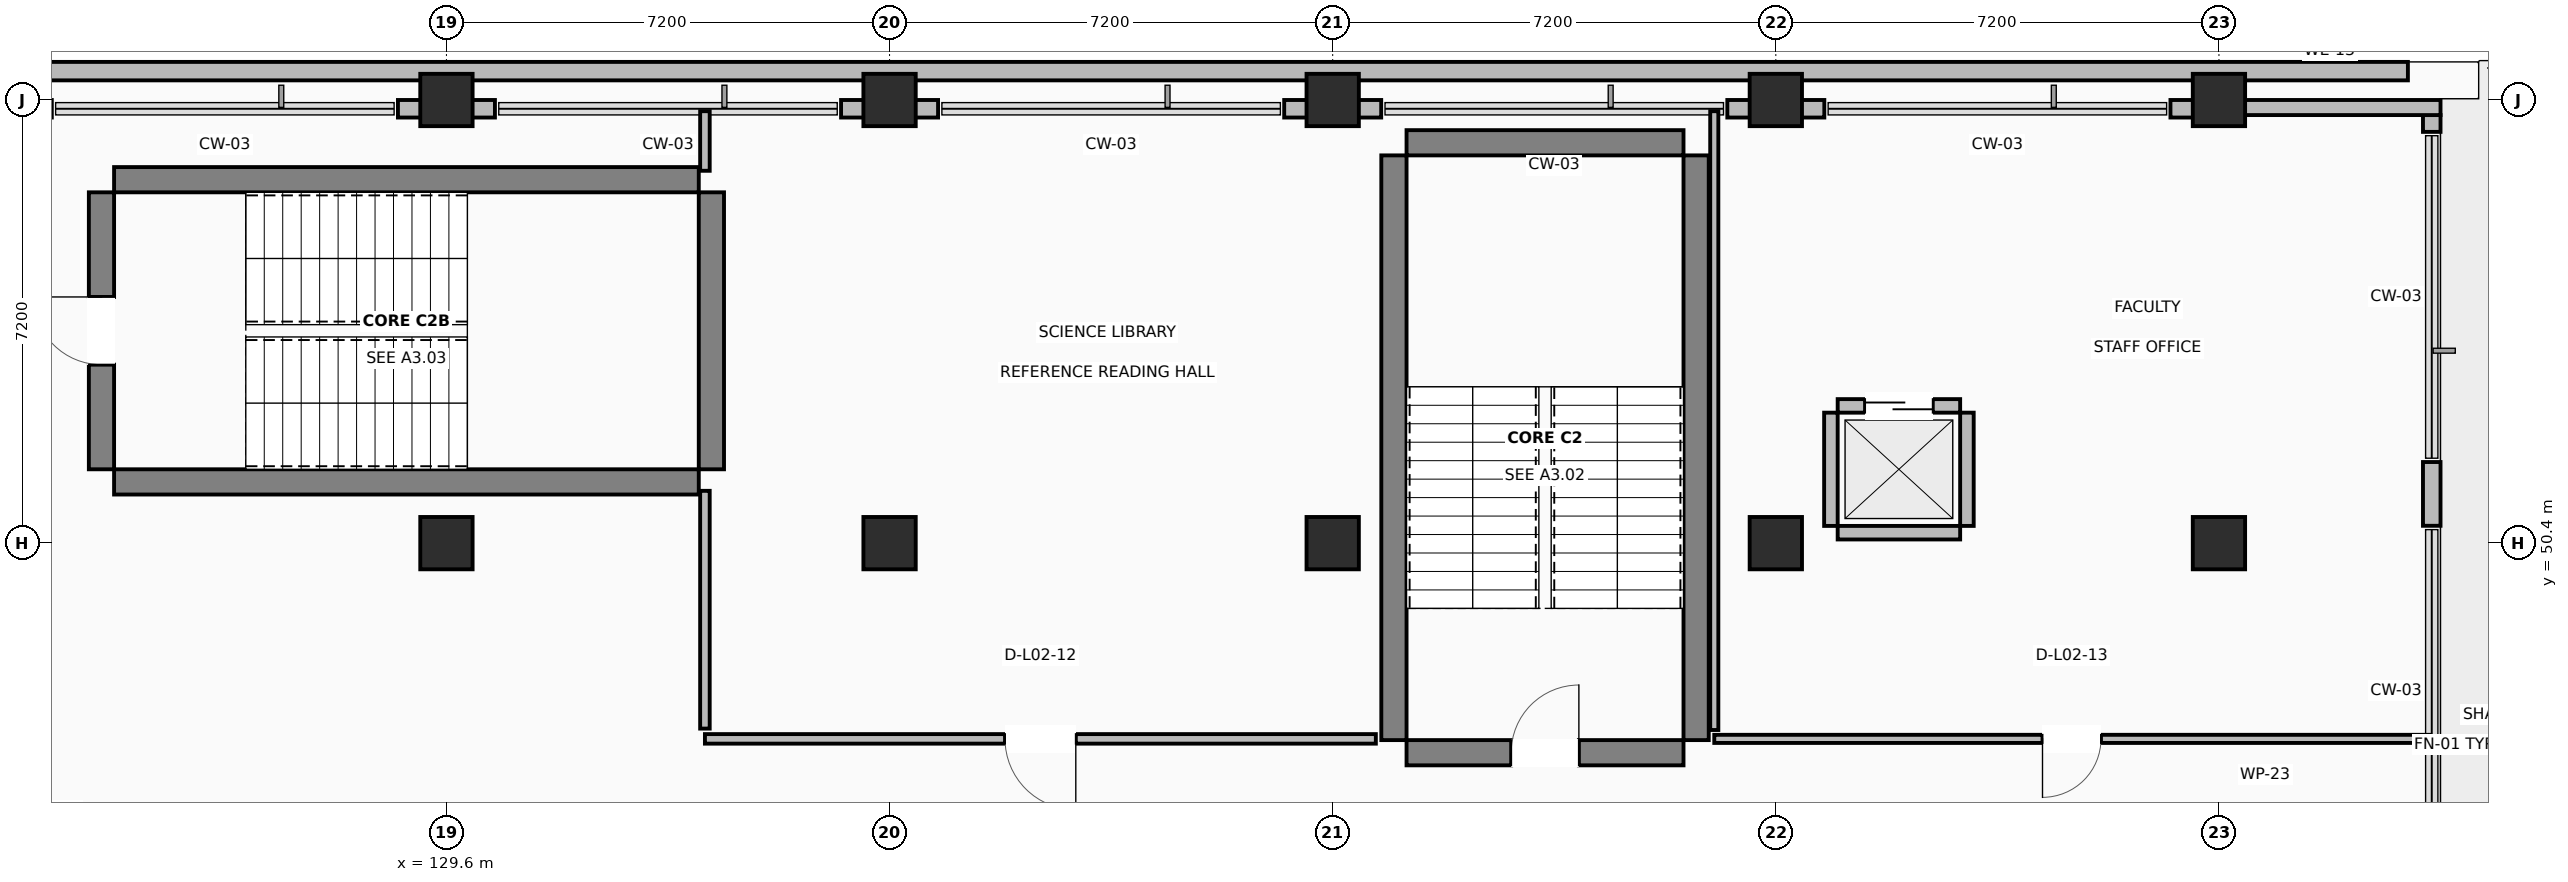
"""IFC4 building model, lengths in metres.
Left out: names, types, materials, properties, quantities, classifications, styles, units other than length and angle.
Written with IfcOpenShell. Run it as: python <this file> out.ifc"""

import sys

from ifc_helpers import new_model, si_unit, direction, frame, frame_2d, origin, origin_2d, place, context, subcontext, project, spatial, rectangle, extrude, element, fill, save


model = new_model("IFC4")
c1 = context("Model", 3, precision=1e-05, world=origin(), true_north=direction((0.0, 1.0)))
c2 = subcontext(c1, "Body", "Model", "MODEL_VIEW")
j1 = project(units=[si_unit("LENGTHUNIT", "METRE"), si_unit("PLANEANGLEUNIT", "RADIAN")], contexts=[c1])
p1 = place(None, origin())
s1 = spatial("IfcSite", under=j1, at=p1, CompositionType="ELEMENT")
p2 = place(p1, origin())
s2 = spatial("IfcBuilding", under=s1, at=p2, CompositionType="ELEMENT")
p3 = place(p2, frame((0.0, 0.0, 9.0)))
s3 = spatial("IfcBuildingStorey", under=s2, at=p3, CompositionType="ELEMENT", Elevation=9.0)
for number, where, z_axis, x_axis in (
    (1, (129.6, 50.4, 0.0), (0.0, 0.0, 1.0), (1.0, 0.0, 0.0)),
    (2, (129.6, 57.6, 0.0), (0.0, 0.0, 1.0), (1.0, 0.0, 0.0)),
    (3, (136.8, 50.4, 0.0), (0.0, 0.0, 1.0), (1.0, 0.0, 0.0)),
    (4, (136.8, 57.6, 0.0), (0.0, 0.0, 1.0), (1.0, 0.0, 0.0)),
    (5, (144.0, 50.4, 0.0), (0.0, 0.0, 1.0), (1.0, 0.0, 0.0)),
    (6, (144.0, 57.6, 0.0), (0.0, 0.0, 1.0), (1.0, 0.0, 0.0)),
    (7, (151.2, 50.4, 0.0), (0.0, 0.0, 1.0), (1.0, 0.0, 0.0)),
    (8, (151.2, 57.6, 0.0), (0.0, 0.0, 1.0), (1.0, 0.0, 0.0)),
    (9, (158.4, 50.4, 0.0), (0.0, 0.0, 1.0), (1.0, 0.0, 0.0)),
    (10, (158.4, 57.6, 0.0), (0.0, 0.0, 1.0), (1.0, 0.0, 0.0)),
):
    element("IfcColumn", number, at=place(p3, frame(where, z_axis=z_axis, x_axis=x_axis)), inside=s3, PredefinedType="COLUMN", context=c2, shape_type="SweptSolid", body=[
        extrude(rectangle(XDim=0.85, YDim=0.85, at=origin_2d()), origin(), (0.0, 0.0, 1.0), 4.22),
    ])
p4 = place(p3, frame((145.2, 46.995, 0.0), z_axis=(0.0, 0.0, 1.0), x_axis=(1.0, 0.0, 0.0)))
e11 = element("IfcWall", 11, at=p4, inside=s3, PredefinedType="SHEAR", context=c2, shape_type="SweptSolid", body=[
    extrude(rectangle(XDim=4.5, YDim=0.41, at=frame_2d((2.25, 0.0))), origin(), (0.0, 0.0, 1.0), 4.22),
])
p5 = place(p4, frame((1.7, 0.0, 0.0)))
e12 = element("IfcOpeningElement", 12, at=p5, cuts=e11, PredefinedType="OPENING", context=c2, shape_type="SweptSolid", body=[
    extrude(rectangle(XDim=1.1, YDim=2.15, at=frame_2d((0.55, 1.075))), frame((0.0, 0.215, 0.0), z_axis=(0.0, -1.0, 0.0), x_axis=(1.0, 0.0, 0.0)), (0.0, 0.0, 1.0), 0.43),
])
p6 = place(p3, frame((145.2, 56.905, 0.0), z_axis=(0.0, 0.0, 1.0), x_axis=(1.0, 0.0, 0.0)))
e13 = element("IfcWall", 13, at=p6, inside=s3, PredefinedType="SHEAR", context=c2, shape_type="SweptSolid", body=[
    extrude(rectangle(XDim=4.5, YDim=0.41, at=frame_2d((2.25, 0.0))), origin(), (0.0, 0.0, 1.0), 4.22),
])
for number, where, z_axis, x_axis in (
    (14, (144.995, 47.2, 0.0), (0.0, 0.0, 1.0), (0.0, 1.0, 0.0)),
    (15, (149.905, 47.2, 0.0), (0.0, 0.0, 1.0), (0.0, 1.0, 0.0)),
    (16, (124.2, 51.395, 0.0), (0.0, 0.0, 1.0), (1.0, 0.0, 0.0)),
    (17, (124.2, 56.305, 0.0), (0.0, 0.0, 1.0), (1.0, 0.0, 0.0)),
):
    element("IfcWall", number, at=place(p3, frame(where, z_axis=z_axis, x_axis=x_axis)), inside=s3, PredefinedType="SHEAR", context=c2, shape_type="SweptSolid", body=[
        extrude(rectangle(XDim=9.5, YDim=0.41, at=frame_2d((4.75, 0.0))), origin(), (0.0, 0.0, 1.0), 4.22),
    ])
p7 = place(p3, frame((123.995, 51.6, 0.0), z_axis=(0.0, 0.0, 1.0), x_axis=(0.0, 1.0, 0.0)))
e18 = element("IfcWall", 18, at=p7, inside=s3, PredefinedType="SHEAR", context=c2, shape_type="SweptSolid", body=[
    extrude(rectangle(XDim=4.5, YDim=0.41, at=frame_2d((2.25, 0.0))), origin(), (0.0, 0.0, 1.0), 4.22),
])
p8 = place(p7, frame((1.7, 0.0, 0.0)))
e19 = element("IfcOpeningElement", 19, at=p8, cuts=e18, PredefinedType="OPENING", context=c2, shape_type="SweptSolid", body=[
    extrude(rectangle(XDim=1.1, YDim=2.15, at=frame_2d((0.55, 1.075))), frame((0.0, 0.215, 0.0), z_axis=(0.0, -1.0, 0.0), x_axis=(1.0, 0.0, 0.0)), (0.0, 0.0, 1.0), 0.43),
])
p9 = place(p3, frame((133.905, 51.6, 0.0), z_axis=(0.0, 0.0, 1.0), x_axis=(0.0, 1.0, 0.0)))
e20 = element("IfcWall", 20, at=p9, inside=s3, PredefinedType="SHEAR", context=c2, shape_type="SweptSolid", body=[
    extrude(rectangle(XDim=4.5, YDim=0.41, at=frame_2d((2.25, 0.0))), origin(), (0.0, 0.0, 1.0), 4.22),
])
p10 = place(p3, frame((161.857, 50.682, 0.0), z_axis=(0.0, 0.0, 1.0), x_axis=(0.0, 1.0, 0.0)))
e21 = element("IfcWall", 21, at=p10, inside=s3, PredefinedType="STANDARD", context=c2, shape_type="SweptSolid", body=[
    extrude(rectangle(XDim=1.036, YDim=0.285, at=frame_2d((0.518, 0.0))), origin(), (0.0, 0.0, 1.0), 3.26),
])
p11 = place(p3, frame((161.857, 57.082, 0.0), z_axis=(0.0, 0.0, 1.0), x_axis=(0.0, 1.0, 0.0)))
e22 = element("IfcWall", 22, at=p11, inside=s3, PredefinedType="STANDARD", context=c2, shape_type="SweptSolid", body=[
    extrude(rectangle(XDim=0.273, YDim=0.285, at=frame_2d((0.136, 0.0))), origin(), (0.0, 0.0, 1.0), 3.26),
])
p12 = place(p3, frame((158.4, 57.478, 0.0), z_axis=(0.0, 0.0, 1.0), x_axis=(1.0, 0.0, 0.0)))
e23 = element("IfcWall", 23, at=p12, inside=s3, PredefinedType="STANDARD", context=c2, shape_type="SweptSolid", body=[
    extrude(rectangle(XDim=3.6, YDim=0.245, at=frame_2d((1.8, 0.0))), origin(), (0.0, 0.0, 1.0), 3.26),
])
p13 = place(p3, frame((158.4, 57.458, 0.0), z_axis=(0.0, 0.0, 1.0), x_axis=(-1.0, 0.0, 0.0)))
e24 = element("IfcWall", 24, at=p13, inside=s3, PredefinedType="STANDARD", context=c2, shape_type="SweptSolid", body=[
    extrude(rectangle(XDim=0.788, YDim=0.285, at=frame_2d((0.394, 0.0))), origin(), (0.0, 0.0, 1.0), 3.26),
])
p14 = place(p3, frame((151.988, 57.458, 0.0), z_axis=(0.0, 0.0, 1.0), x_axis=(-1.0, 0.0, 0.0)))
e25 = element("IfcWall", 25, at=p14, inside=s3, PredefinedType="STANDARD", context=c2, shape_type="SweptSolid", body=[
    extrude(rectangle(XDim=1.576, YDim=0.285, at=frame_2d((0.788, 0.0))), origin(), (0.0, 0.0, 1.0), 3.26),
])
p15 = place(p3, frame((144.788, 57.458, 0.0), z_axis=(0.0, 0.0, 1.0), x_axis=(-1.0, 0.0, 0.0)))
e26 = element("IfcWall", 26, at=p15, inside=s3, PredefinedType="STANDARD", context=c2, shape_type="SweptSolid", body=[
    extrude(rectangle(XDim=1.576, YDim=0.285, at=frame_2d((0.788, 0.0))), origin(), (0.0, 0.0, 1.0), 3.26),
])
for number, where, z_axis, x_axis in (
    (27, (137.588, 57.458, 0.0), (0.0, 0.0, 1.0), (-1.0, 0.0, 0.0)),
    (28, (130.388, 57.458, 0.0), (0.0, 0.0, 1.0), (-1.0, 0.0, 0.0)),
):
    element("IfcWall", number, at=place(p3, frame(where, z_axis=z_axis, x_axis=x_axis)), inside=s3, PredefinedType="STANDARD", context=c2, shape_type="SweptSolid", body=[
        extrude(rectangle(XDim=1.576, YDim=0.285, at=frame_2d((0.788, 0.0))), origin(), (0.0, 0.0, 1.0), 3.26),
    ])
p16 = place(p3, frame((114.58, 58.069, 0.0), z_axis=(0.0, 0.0, 1.0), x_axis=(1.0, 0.0, 0.0)))
e29 = element("IfcWall", 29, at=p16, inside=s3, PredefinedType="PARAPET", context=c2, shape_type="SweptSolid", body=[
    extrude(rectangle(XDim=46.89, YDim=0.3, at=frame_2d((23.445, 0.0))), origin(), (0.0, 0.0, 1.0), 1.18),
])
p17 = place(p3, frame((152.205, 50.57, 0.0), z_axis=(0.0, 0.0, 1.0), x_axis=(1.0, 0.0, 0.0)))
e30 = element("IfcWall", 30, at=p17, inside=s3, PredefinedType="STANDARD", context=c2, shape_type="SweptSolid", body=[
    extrude(rectangle(XDim=1.99, YDim=0.22, at=frame_2d((0.995, 0.0))), origin(), (0.0, 0.0, 1.0), 3.26),
])
p18 = place(p3, frame((152.205, 52.63, 0.0), z_axis=(0.0, 0.0, 1.0), x_axis=(1.0, 0.0, 0.0)))
e31 = element("IfcWall", 31, at=p18, inside=s3, PredefinedType="STANDARD", context=c2, shape_type="SweptSolid", body=[
    extrude(rectangle(XDim=1.99, YDim=0.22, at=frame_2d((0.995, 0.0))), origin(), (0.0, 0.0, 1.0), 3.26),
])
p19 = place(p18, frame((0.445, 0.0, 0.0)))
e32 = element("IfcOpeningElement", 32, at=p19, cuts=e31, PredefinedType="OPENING", context=c2, shape_type="SweptSolid", body=[
    extrude(rectangle(XDim=1.1, YDim=2.15, at=frame_2d((0.55, 1.075))), frame((0.0, 0.12, 0.0), z_axis=(0.0, -1.0, 0.0), x_axis=(1.0, 0.0, 0.0)), (0.0, 0.0, 1.0), 0.24),
])
for number, where, z_axis, x_axis in (
    (33, (152.095, 50.68, 0.0), (0.0, 0.0, 1.0), (0.0, 1.0, 0.0)),
    (34, (154.305, 50.68, 0.0), (0.0, 0.0, 1.0), (0.0, 1.0, 0.0)),
):
    element("IfcWall", number, at=place(p3, frame(where, z_axis=z_axis, x_axis=x_axis)), inside=s3, PredefinedType="STANDARD", context=c2, shape_type="SweptSolid", body=[
        extrude(rectangle(XDim=1.84, YDim=0.22, at=frame_2d((0.92, 0.0))), origin(), (0.0, 0.0, 1.0), 3.26),
    ])
p20 = place(p3, frame((144.701, 47.22, 0.0), z_axis=(0.0, 0.0, 1.0), x_axis=(-1.0, 0.0, 0.0)))
e35 = element("IfcWall", 35, at=p20, inside=s3, PredefinedType="PARTITIONING", context=c2, shape_type="SweptSolid", body=[
    extrude(rectangle(XDim=10.901, YDim=0.155, at=frame_2d((5.45, 0.0))), origin(), (0.0, 0.0, 1.0), 3.26),
])
p21 = place(p20, frame((4.875, 0.0, 0.0)))
e36 = element("IfcOpeningElement", 36, at=p21, cuts=e35, PredefinedType="OPENING", context=c2, shape_type="SweptSolid", body=[
    extrude(rectangle(XDim=1.15, YDim=2.15, at=frame_2d((0.575, 1.075))), frame((0.0, 0.087, 0.0), z_axis=(0.0, -1.0, 0.0), x_axis=(1.0, 0.0, 0.0)), (0.0, 0.0, 1.0), 0.175),
])
p22 = place(p3, frame((133.8, 47.387, 0.0), z_axis=(0.0, 0.0, 1.0), x_axis=(0.0, 1.0, 0.0)))
e37 = element("IfcWall", 37, at=p22, inside=s3, PredefinedType="PARTITIONING", context=c2, shape_type="SweptSolid", body=[
    extrude(rectangle(XDim=3.863, YDim=0.155, at=frame_2d((1.932, 0.0))), origin(), (0.0, 0.0, 1.0), 3.26),
])
p23 = place(p3, frame((133.8, 56.45, 0.0), z_axis=(0.0, 0.0, 1.0), x_axis=(0.0, 1.0, 0.0)))
e38 = element("IfcWall", 38, at=p23, inside=s3, PredefinedType="PARTITIONING", context=c2, shape_type="SweptSolid", body=[
    extrude(rectangle(XDim=0.968, YDim=0.155, at=frame_2d((0.484, 0.0))), origin(), (0.0, 0.0, 1.0), 3.26),
])
p24 = place(p3, frame((161.817, 47.22, 0.0), z_axis=(0.0, 0.0, 1.0), x_axis=(-1.0, 0.0, 0.0)))
e39 = element("IfcWall", 39, at=p24, inside=s3, PredefinedType="PARTITIONING", context=c2, shape_type="SweptSolid", body=[
    extrude(rectangle(XDim=11.617, YDim=0.132, at=frame_2d((5.809, 0.0))), origin(), (0.0, 0.0, 1.0), 3.26),
])
p25 = place(p24, frame((5.334, 0.0, 0.0)))
e40 = element("IfcOpeningElement", 40, at=p25, cuts=e39, PredefinedType="OPENING", context=c2, shape_type="SweptSolid", body=[
    extrude(rectangle(XDim=0.95, YDim=2.1, at=frame_2d((0.475, 1.05))), frame((0.0, 0.076, 0.0), z_axis=(0.0, -1.0, 0.0), x_axis=(1.0, 0.0, 0.0)), (0.0, 0.0, 1.0), 0.152),
])
p26 = place(p3, frame((150.2, 47.364, 0.0), z_axis=(0.0, 0.0, 1.0), x_axis=(0.0, 1.0, 0.0)))
e41 = element("IfcWall", 41, at=p26, inside=s3, PredefinedType="PARTITIONING", context=c2, shape_type="SweptSolid", body=[
    extrude(rectangle(XDim=10.054, YDim=0.132, at=frame_2d((5.027, 0.0))), origin(), (0.0, 0.0, 1.0), 3.26),
])
p27 = place(p5, origin())
e42 = element("IfcDoor", 42, at=p27, inside=s3, OperationType="SINGLE_SWING_RIGHT", PredefinedType="DOOR", context=c2, shape_type="SweptSolid", body=[
    extrude(rectangle(XDim=1.1, YDim=2.15, at=frame_2d((0.55, 1.075))), frame((0.0, 0.025, 0.0), z_axis=(0.0, -1.0, 0.0), x_axis=(1.0, 0.0, 0.0)), (0.0, 0.0, 1.0), 0.05),
])
fill(e12, e42)
p28 = place(p8, origin())
e43 = element("IfcDoor", 43, at=p28, inside=s3, OperationType="SINGLE_SWING_RIGHT", PredefinedType="DOOR", context=c2, shape_type="SweptSolid", body=[
    extrude(rectangle(XDim=1.1, YDim=2.15, at=frame_2d((0.55, 1.075))), frame((0.0, 0.025, 0.0), z_axis=(0.0, -1.0, 0.0), x_axis=(1.0, 0.0, 0.0)), (0.0, 0.0, 1.0), 0.05),
])
fill(e19, e43)
p29 = place(p19, origin())
e44 = element("IfcDoor", 44, at=p29, inside=s3, OperationType="SLIDING_TO_RIGHT", PredefinedType="DOOR", context=c2, shape_type="SweptSolid", body=[
    extrude(rectangle(XDim=1.1, YDim=2.15, at=frame_2d((0.55, 1.075))), frame((0.0, 0.025, 0.0), z_axis=(0.0, -1.0, 0.0), x_axis=(1.0, 0.0, 0.0)), (0.0, 0.0, 1.0), 0.05),
])
fill(e32, e44)
p30 = place(p21, origin())
e45 = element("IfcDoor", 45, at=p30, inside=s3, OperationType="SINGLE_SWING_LEFT", PredefinedType="DOOR", context=c2, shape_type="SweptSolid", body=[
    extrude(rectangle(XDim=1.15, YDim=2.15, at=frame_2d((0.575, 1.075))), frame((0.0, 0.025, 0.0), z_axis=(0.0, -1.0, 0.0), x_axis=(1.0, 0.0, 0.0)), (0.0, 0.0, 1.0), 0.05),
])
fill(e36, e45)
p31 = place(p25, origin())
e46 = element("IfcDoor", 46, at=p31, inside=s3, OperationType="SINGLE_SWING_RIGHT", PredefinedType="DOOR", context=c2, shape_type="SweptSolid", body=[
    extrude(rectangle(XDim=0.95, YDim=2.1, at=frame_2d((0.475, 1.05))), frame((0.0, 0.025, 0.0), z_axis=(0.0, -1.0, 0.0), x_axis=(1.0, 0.0, 0.0)), (0.0, 0.0, 1.0), 0.05),
])
fill(e40, e46)
save(model, sys.argv[1])
